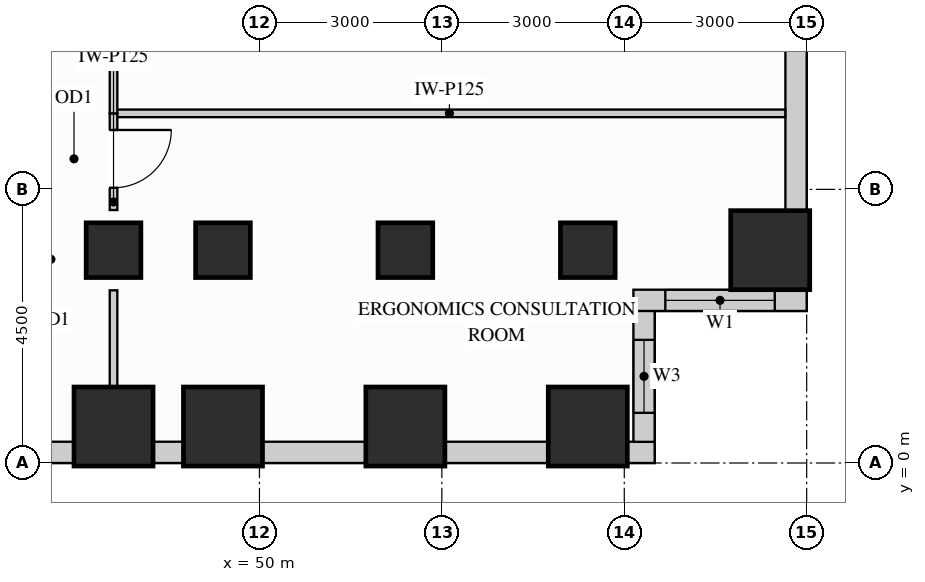
"""IFC4 building model, lengths in metres.
Left out: names, types, materials, properties, quantities, classifications, styles, units other than length and angle.
Written with IfcOpenShell. Run it as: python <this file> out.ifc"""

import sys

from ifc_helpers import new_model, si_unit, direction, frame, frame_2d, origin, origin_2d, place, context, subcontext, project, spatial, rectangle, extrude, source, transform, mapped, element, fill, save


model = new_model("IFC4")
c1 = context("Model", 3, precision=1e-05, world=origin(), true_north=direction((0.0, 1.0)))
c2 = subcontext(c1, "Body", "Model", "MODEL_VIEW")
j1 = project(units=[si_unit("LENGTHUNIT", "METRE"), si_unit("PLANEANGLEUNIT", "RADIAN")], contexts=[c1])
p1 = place(None, origin())
s1 = spatial("IfcSite", under=j1, at=p1, CompositionType="ELEMENT")
p2 = place(p1, origin())
s2 = spatial("IfcBuilding", under=s1, at=p2, CompositionType="ELEMENT")
p3 = place(p2, frame((0.0, 0.0, 54.9)))
s3 = spatial("IfcBuildingStorey", under=s2, at=p3, CompositionType="ELEMENT", Elevation=54.9)
m1 = source(origin(), c2, "Body", "SweptSolid", [
    extrude(rectangle(XDim=0.9, YDim=0.9, at=origin_2d()), origin(), (0.0, 0.0, 1.0), 3.38),
])
for number, where, z_axis, x_axis in (
    (1, (47.6, 3.5, 0.0), (0.0, 0.0, 1.0), (1.0, 0.0, 0.0)),
    (2, (49.4, 3.5, 0.0), (0.0, 0.0, 1.0), (1.0, 0.0, 0.0)),
    (3, (52.4, 3.5, 0.0), (0.0, 0.0, 1.0), (1.0, 0.0, 0.0)),
    (4, (55.4, 3.5, 0.0), (0.0, 0.0, 1.0), (1.0, 0.0, 0.0)),
):
    element("IfcColumn", number, at=place(p3, frame(where, z_axis=z_axis, x_axis=x_axis)), inside=s3, PredefinedType="COLUMN", context=c2, shape_type="MappedRepresentation", body=[
        mapped(m1, transform((0.0, 0.0, 0.0), x_axis=(1.0, 0.0, 0.0), y_axis=(0.0, 1.0, 0.0), z_axis=(0.0, 0.0, 1.0))),
    ])
m2 = source(origin(), c2, "Body", "SweptSolid", [
    extrude(rectangle(XDim=1.3, YDim=1.3, at=origin_2d()), origin(), (0.0, 0.0, 1.0), 3.38),
])
for number, where, z_axis, x_axis in (
    (5, (58.4, 3.5, 0.0), (0.0, 0.0, 1.0), (1.0, 0.0, 0.0)),
    (6, (47.6, 0.6, 0.0), (0.0, 0.0, 1.0), (1.0, 0.0, 0.0)),
    (7, (49.4, 0.6, 0.0), (0.0, 0.0, 1.0), (1.0, 0.0, 0.0)),
    (8, (52.4, 0.6, 0.0), (0.0, 0.0, 1.0), (1.0, 0.0, 0.0)),
    (9, (55.4, 0.6, 0.0), (0.0, 0.0, 1.0), (1.0, 0.0, 0.0)),
):
    element("IfcColumn", number, at=place(p3, frame(where, z_axis=z_axis, x_axis=x_axis)), inside=s3, PredefinedType="COLUMN", context=c2, shape_type="MappedRepresentation", body=[
        mapped(m2, transform((0.0, 0.0, 0.0), x_axis=(1.0, 0.0, 0.0), y_axis=(0.0, 1.0, 0.0), z_axis=(0.0, 0.0, 1.0))),
    ])
p4 = place(p3, frame((40.648, 0.175, 0.0), z_axis=(0.0, 0.0, 1.0), x_axis=(1.0, 0.0, 0.0)))
e10 = element("IfcWall", 10, at=p4, inside=s3, PredefinedType="SOLIDWALL", context=c2, shape_type="SweptSolid", body=[
    extrude(rectangle(XDim=6.304, YDim=0.35, at=frame_2d((3.152, 0.0))), origin(), (0.0, 0.0, 1.0), 2.51),
])
p5 = place(p4, frame((0.687, 0.0, 0.78)))
e11 = element("IfcOpeningElement", 11, at=p5, cuts=e10, PredefinedType="OPENING", context=c2, shape_type="SweptSolid", body=[
    extrude(rectangle(XDim=1.8, YDim=1.55, at=frame_2d((0.9, 0.775))), frame((0.0, 0.185, 0.0), z_axis=(0.0, -1.0, 0.0), x_axis=(1.0, 0.0, 0.0)), (0.0, 0.0, 1.0), 0.37),
])
p6 = place(p4, frame((2.855, 0.0, 0.78)))
e12 = element("IfcOpeningElement", 12, at=p6, cuts=e10, PredefinedType="OPENING", context=c2, shape_type="SweptSolid", body=[
    extrude(rectangle(XDim=1.8, YDim=1.55, at=frame_2d((0.9, 0.775))), frame((0.0, 0.185, 0.0), z_axis=(0.0, -1.0, 0.0), x_axis=(1.0, 0.0, 0.0)), (0.0, 0.0, 1.0), 0.37),
])
m3 = source(origin(), c2, "Body", "SweptSolid", [
    extrude(rectangle(XDim=0.504, YDim=0.35, at=frame_2d((0.252, 0.0))), origin(), (0.0, 0.0, 1.0), 3.365),
])
p7 = place(p3, frame((48.248, 0.175, 0.0), z_axis=(0.0, 0.0, 1.0), x_axis=(1.0, 0.0, 0.0)))
e13 = element("IfcWall", 13, at=p7, inside=s3, PredefinedType="SOLIDWALL", context=c2, shape_type="MappedRepresentation", body=[
    mapped(m3, transform((0.0, 0.0, 0.0), x_axis=(1.0, 0.0, 0.0), y_axis=(0.0, 1.0, 0.0), z_axis=(0.0, 0.0, 1.0))),
])
m4 = source(origin(), c2, "Body", "SweptSolid", [
    extrude(rectangle(XDim=1.704, YDim=0.35, at=frame_2d((0.852, 0.0))), origin(), (0.0, 0.0, 1.0), 2.51),
])
for number, where, z_axis, x_axis in (
    (14, (50.048, 0.175, 0.0), (0.0, 0.0, 1.0), (1.0, 0.0, 0.0)),
    (15, (53.048, 0.175, 0.0), (0.0, 0.0, 1.0), (1.0, 0.0, 0.0)),
):
    element("IfcWall", number, at=place(p3, frame(where, z_axis=z_axis, x_axis=x_axis)), inside=s3, PredefinedType="SOLIDWALL", context=c2, shape_type="MappedRepresentation", body=[
        mapped(m4, transform((0.0, 0.0, 0.0), x_axis=(1.0, 0.0, 0.0), y_axis=(0.0, 1.0, 0.0), z_axis=(0.0, 0.0, 1.0))),
    ])
m5 = source(origin(), c2, "Body", "SweptSolid", [
    extrude(rectangle(XDim=0.452, YDim=0.35, at=frame_2d((0.226, 0.0))), origin(), (0.0, 0.0, 1.0), 3.365),
])
p8 = place(p3, frame((56.048, 0.175, 0.0), z_axis=(0.0, 0.0, 1.0), x_axis=(1.0, 0.0, 0.0)))
e16 = element("IfcWall", 16, at=p8, inside=s3, PredefinedType="SOLIDWALL", context=c2, shape_type="MappedRepresentation", body=[
    mapped(m5, transform((0.0, 0.0, 0.0), x_axis=(1.0, 0.0, 0.0), y_axis=(0.0, 1.0, 0.0), z_axis=(0.0, 0.0, 1.0))),
])
p9 = place(p3, frame((56.325, 0.348, 0.0), z_axis=(0.0, 0.0, 1.0), x_axis=(0.0, 1.0, 0.0)))
e17 = element("IfcWall", 17, at=p9, inside=s3, PredefinedType="SOLIDWALL", context=c2, shape_type="SweptSolid", body=[
    extrude(rectangle(XDim=2.154, YDim=0.35, at=frame_2d((1.077, 0.0))), origin(), (0.0, 0.0, 1.0), 3.365),
])
p10 = place(p9, frame((0.477, 0.0, 0.78)))
e18 = element("IfcOpeningElement", 18, at=p10, cuts=e17, PredefinedType="OPENING", context=c2, shape_type="SweptSolid", body=[
    extrude(rectangle(XDim=1.2, YDim=2.1, at=frame_2d((0.6, 1.05))), frame((0.0, 0.185, 0.0), z_axis=(0.0, -1.0, 0.0), x_axis=(1.0, 0.0, 0.0)), (0.0, 0.0, 1.0), 0.37),
])
p11 = place(p3, frame((56.15, 2.675, 0.0), z_axis=(0.0, 0.0, 1.0), x_axis=(1.0, 0.0, 0.0)))
e19 = element("IfcWall", 19, at=p11, inside=s3, PredefinedType="SOLIDWALL", context=c2, shape_type="SweptSolid", body=[
    extrude(rectangle(XDim=2.85, YDim=0.35, at=frame_2d((1.425, 0.0))), origin(), (0.0, 0.0, 1.0), 3.365),
])
p12 = place(p11, frame((0.525, 0.0, 0.78)))
e20 = element("IfcOpeningElement", 20, at=p12, cuts=e19, PredefinedType="OPENING", context=c2, shape_type="SweptSolid", body=[
    extrude(rectangle(XDim=1.8, YDim=2.1, at=frame_2d((0.9, 1.05))), frame((0.0, 0.185, 0.0), z_axis=(0.0, -1.0, 0.0), x_axis=(1.0, 0.0, 0.0)), (0.0, 0.0, 1.0), 0.37),
])
m6 = source(origin(), c2, "Body", "SweptSolid", [
    extrude(rectangle(XDim=3.204, YDim=0.35, at=frame_2d((1.602, 0.0))), origin(), (0.0, 0.0, 1.0), 2.51),
])
p13 = place(p3, frame((58.825, 4.148, 0.0), z_axis=(0.0, 0.0, 1.0), x_axis=(0.0, 1.0, 0.0)))
e21 = element("IfcWall", 21, at=p13, inside=s3, PredefinedType="SOLIDWALL", context=c2, shape_type="MappedRepresentation", body=[
    mapped(m6, transform((0.0, 0.0, 0.0), x_axis=(1.0, 0.0, 0.0), y_axis=(0.0, 1.0, 0.0), z_axis=(0.0, 0.0, 1.0))),
])
m7 = source(origin(), c2, "Body", "SweptSolid", [
    extrude(rectangle(XDim=11.048, YDim=0.125, at=frame_2d((5.524, 0.0))), origin(), (0.0, 0.0, 1.0), 3.365),
])
p14 = place(p3, frame((47.6, 5.75, 0.0), z_axis=(0.0, 0.0, 1.0), x_axis=(1.0, 0.0, 0.0)))
e22 = element("IfcWall", 22, at=p14, inside=s3, PredefinedType="PARTITIONING", context=c2, shape_type="MappedRepresentation", body=[
    mapped(m7, transform((0.0, 0.0, 0.0), x_axis=(1.0, 0.0, 0.0), y_axis=(0.0, 1.0, 0.0), z_axis=(0.0, 0.0, 1.0))),
])
p15 = place(p3, frame((47.6, 4.16, 0.0), z_axis=(0.0, 0.0, 1.0), x_axis=(0.0, 1.0, 0.0)))
e23 = element("IfcWall", 23, at=p15, inside=s3, PredefinedType="PARTITIONING", context=c2, shape_type="SweptSolid", body=[
    extrude(rectangle(XDim=1.59, YDim=0.125, at=frame_2d((0.795, 0.0))), origin(), (0.0, 0.0, 1.0), 2.67),
])
p16 = place(p15, frame((0.367, 0.0, 0.0)))
e24 = element("IfcOpeningElement", 24, at=p16, cuts=e23, PredefinedType="OPENING", context=c2, shape_type="SweptSolid", body=[
    extrude(rectangle(XDim=0.95, YDim=2.15, at=frame_2d((0.475, 1.075))), frame((0.0, 0.073, 0.0), z_axis=(0.0, -1.0, 0.0), x_axis=(1.0, 0.0, 0.0)), (0.0, 0.0, 1.0), 0.145),
])
m8 = source(origin(), c2, "Body", "SweptSolid", [
    extrude(rectangle(XDim=1.58, YDim=0.125, at=frame_2d((0.79, 0.0))), origin(), (0.0, 0.0, 1.0), 2.67),
])
p17 = place(p3, frame((47.6, 1.26, 0.0), z_axis=(0.0, 0.0, 1.0), x_axis=(0.0, 1.0, 0.0)))
e25 = element("IfcWall", 25, at=p17, inside=s3, PredefinedType="PARTITIONING", context=c2, shape_type="MappedRepresentation", body=[
    mapped(m8, transform((0.0, 0.0, 0.0), x_axis=(1.0, 0.0, 0.0), y_axis=(0.0, 1.0, 0.0), z_axis=(0.0, 0.0, 1.0))),
])
m9 = source(origin(), c2, "Body", "SweptSolid", [
    extrude(rectangle(XDim=1.59, YDim=0.125, at=frame_2d((0.795, 0.0))), origin(), (0.0, 0.0, 1.0), 2.67),
])
p18 = place(p3, frame((47.6, 5.75, 0.0), z_axis=(0.0, 0.0, 1.0), x_axis=(0.0, 1.0, 0.0)))
e26 = element("IfcWall", 26, at=p18, inside=s3, PredefinedType="PARTITIONING", context=c2, shape_type="MappedRepresentation", body=[
    mapped(m9, transform((0.0, 0.0, 0.0), x_axis=(1.0, 0.0, 0.0), y_axis=(0.0, 1.0, 0.0), z_axis=(0.0, 0.0, 1.0))),
])
m10 = source(origin(), c2, "Body", "SweptSolid", [
    extrude(rectangle(XDim=0.95, YDim=2.15, at=frame_2d((0.475, 1.075))), frame((0.0, 0.025, 0.0), z_axis=(0.0, -1.0, 0.0), x_axis=(1.0, 0.0, 0.0)), (0.0, 0.0, 1.0), 0.05),
])
p19 = place(p16, origin())
e27 = element("IfcDoor", 27, at=p19, inside=s3, OperationType="SINGLE_SWING_RIGHT", PredefinedType="DOOR", context=c2, shape_type="MappedRepresentation", body=[
    mapped(m10, transform((0.0, 0.0, 0.0), x_axis=(1.0, 0.0, 0.0), y_axis=(0.0, 1.0, 0.0), z_axis=(0.0, 0.0, 1.0))),
])
fill(e24, e27)
m11 = source(origin(), c2, "Body", "SweptSolid", [
    extrude(rectangle(XDim=1.8, YDim=2.1, at=frame_2d((0.9, 1.05))), frame((0.0, 0.03, 0.0), z_axis=(0.0, -1.0, 0.0), x_axis=(1.0, 0.0, 0.0)), (0.0, 0.0, 1.0), 0.06),
])
p20 = place(p12, origin())
e28 = element("IfcWindow", 28, at=p20, inside=s3, PartitioningType="SINGLE_PANEL", PredefinedType="WINDOW", context=c2, shape_type="MappedRepresentation", body=[
    mapped(m11, transform((0.0, 0.0, 0.0), x_axis=(1.0, 0.0, 0.0), y_axis=(0.0, 1.0, 0.0), z_axis=(0.0, 0.0, 1.0))),
])
fill(e20, e28)
m12 = source(origin(), c2, "Body", "SweptSolid", [
    extrude(rectangle(XDim=1.2, YDim=2.1, at=frame_2d((0.6, 1.05))), frame((0.0, 0.03, 0.0), z_axis=(0.0, -1.0, 0.0), x_axis=(1.0, 0.0, 0.0)), (0.0, 0.0, 1.0), 0.06),
])
p21 = place(p10, origin())
e29 = element("IfcWindow", 29, at=p21, inside=s3, PartitioningType="SINGLE_PANEL", PredefinedType="WINDOW", context=c2, shape_type="MappedRepresentation", body=[
    mapped(m12, transform((0.0, 0.0, 0.0), x_axis=(1.0, 0.0, 0.0), y_axis=(0.0, 1.0, 0.0), z_axis=(0.0, 0.0, 1.0))),
])
fill(e18, e29)
save(model, sys.argv[1])
